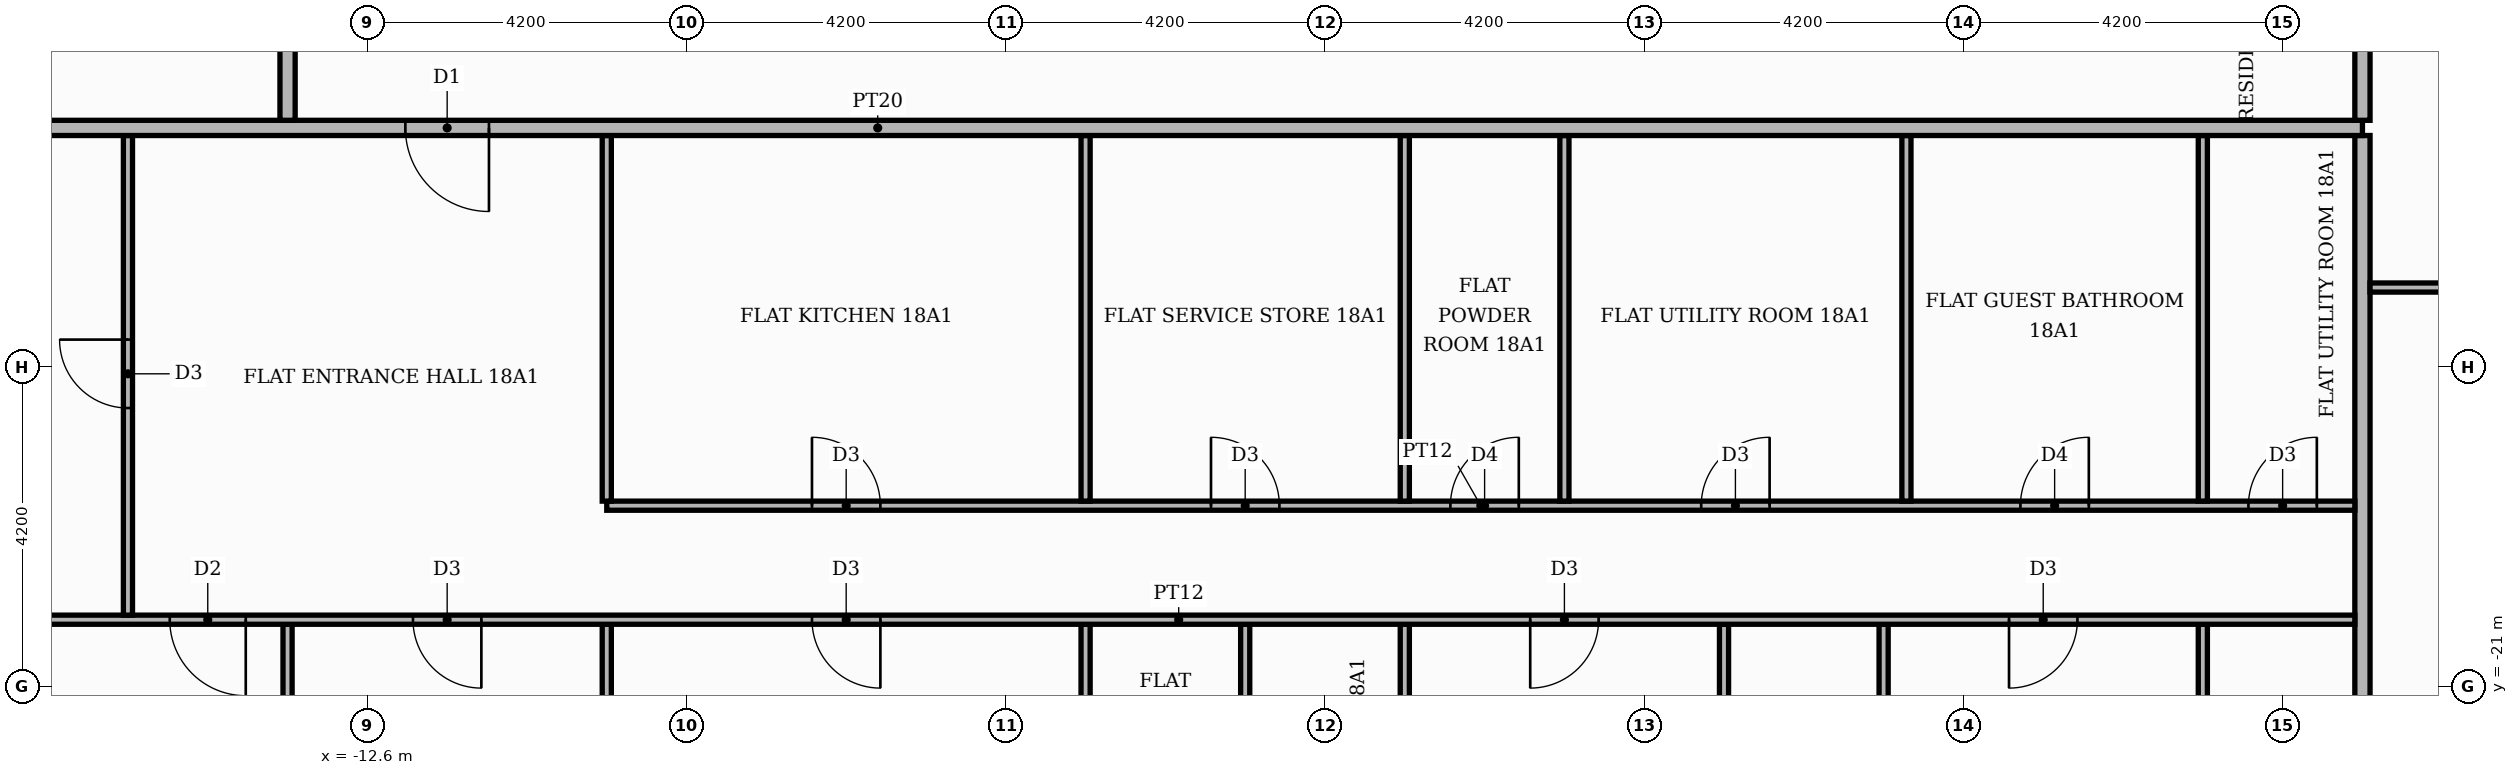
"""IFC4 building model, lengths in metres.
Left out: names, types, materials, properties, quantities, classifications, styles, units other than length and angle.
Written with IfcOpenShell. Run it as: python <this file> out.ifc"""

import sys

from ifc_helpers import new_model, si_unit, direction, frame, frame_2d, origin, place, context, subcontext, project, spatial, rectangle, extrude, element, fill, save


model = new_model("IFC4")
c1 = context("Model", 3, precision=1e-05, world=origin(), true_north=direction((0.0, 1.0)))
c2 = subcontext(c1, "Body", "Model", "MODEL_VIEW")
j1 = project(units=[si_unit("LENGTHUNIT", "METRE"), si_unit("PLANEANGLEUNIT", "RADIAN")], contexts=[c1])
p1 = place(None, origin())
s1 = spatial("IfcSite", under=j1, at=p1, CompositionType="ELEMENT")
p2 = place(p1, origin())
s2 = spatial("IfcBuilding", under=s1, at=p2, CompositionType="ELEMENT")
p3 = place(p2, frame((0.0, 0.0, 79.2)))
s3 = spatial("IfcBuildingStorey", under=s2, at=p3, CompositionType="ELEMENT", Elevation=79.2)
for number, where, z_axis, x_axis in (
    (1, (-13.65, -25.42, 0.0), (0.0, 0.0, 1.0), (0.0, 1.0, 0.0)),
    (2, (-9.45, -25.42, 0.0), (0.0, 0.0, 1.0), (0.0, 1.0, 0.0)),
):
    element("IfcWall", number, at=place(p3, frame(where, z_axis=z_axis, x_axis=x_axis)), inside=s3, PredefinedType="PARTITIONING", context=c2, shape_type="SweptSolid", body=[
        extrude(rectangle(XDim=5.24, YDim=0.12, at=frame_2d((2.62, 0.0))), origin(), (0.0, 0.0, 1.0), 3.48),
    ])
p4 = place(p3, frame((-3.15, -25.42, 0.0), z_axis=(0.0, 0.0, 1.0), x_axis=(0.0, 1.0, 0.0)))
e3 = element("IfcWall", 3, at=p4, inside=s3, PredefinedType="PARTITIONING", context=c2, shape_type="SweptSolid", body=[
    extrude(rectangle(XDim=5.24, YDim=0.12, at=frame_2d((2.62, 0.0))), origin(), (0.0, 0.0, 1.0), 3.48),
])
p5 = place(p4, frame((2.05, 0.0, 0.0)))
e4 = element("IfcOpeningElement", 4, at=p5, cuts=e3, PredefinedType="OPENING", context=c2, shape_type="SweptSolid", body=[
    extrude(rectangle(XDim=0.9, YDim=2.1, at=frame_2d((0.45, 1.05))), frame((0.0, 0.07, 0.0), z_axis=(0.0, -1.0, 0.0), x_axis=(1.0, 0.0, 0.0)), (0.0, 0.0, 1.0), 0.14),
])
p6 = place(p3, frame((-1.05, -25.42, 0.0), z_axis=(0.0, 0.0, 1.0), x_axis=(0.0, 1.0, 0.0)))
e5 = element("IfcWall", 5, at=p6, inside=s3, PredefinedType="PARTITIONING", context=c2, shape_type="SweptSolid", body=[
    extrude(rectangle(XDim=5.24, YDim=0.12, at=frame_2d((2.62, 0.0))), origin(), (0.0, 0.0, 1.0), 3.48),
])
p7 = place(p6, frame((2.05, 0.0, 0.0)))
e6 = element("IfcOpeningElement", 6, at=p7, cuts=e5, PredefinedType="OPENING", context=c2, shape_type="SweptSolid", body=[
    extrude(rectangle(XDim=0.9, YDim=2.1, at=frame_2d((0.45, 1.05))), frame((0.0, 0.07, 0.0), z_axis=(0.0, -1.0, 0.0), x_axis=(1.0, 0.0, 0.0)), (0.0, 0.0, 1.0), 0.14),
])
p8 = place(p3, frame((1.05, -25.42, 0.0), z_axis=(0.0, 0.0, 1.0), x_axis=(0.0, 1.0, 0.0)))
e7 = element("IfcWall", 7, at=p8, inside=s3, PredefinedType="PARTITIONING", context=c2, shape_type="SweptSolid", body=[
    extrude(rectangle(XDim=5.24, YDim=0.12, at=frame_2d((2.62, 0.0))), origin(), (0.0, 0.0, 1.0), 3.48),
])
p9 = place(p3, frame((5.25, -25.42, 0.0), z_axis=(0.0, 0.0, 1.0), x_axis=(0.0, 1.0, 0.0)))
e8 = element("IfcWall", 8, at=p9, inside=s3, PredefinedType="PARTITIONING", context=c2, shape_type="SweptSolid", body=[
    extrude(rectangle(XDim=5.24, YDim=0.12, at=frame_2d((2.62, 0.0))), origin(), (0.0, 0.0, 1.0), 3.48),
])
p10 = place(p9, frame((2.05, 0.0, 0.0)))
e9 = element("IfcOpeningElement", 9, at=p10, cuts=e8, PredefinedType="OPENING", context=c2, shape_type="SweptSolid", body=[
    extrude(rectangle(XDim=0.9, YDim=2.1, at=frame_2d((0.45, 1.05))), frame((0.0, 0.07, 0.0), z_axis=(0.0, -1.0, 0.0), x_axis=(1.0, 0.0, 0.0)), (0.0, 0.0, 1.0), 0.14),
])
p11 = place(p3, frame((7.35, -25.42, 0.0), z_axis=(0.0, 0.0, 1.0), x_axis=(0.0, 1.0, 0.0)))
e10 = element("IfcWall", 10, at=p11, inside=s3, PredefinedType="PARTITIONING", context=c2, shape_type="SweptSolid", body=[
    extrude(rectangle(XDim=5.24, YDim=0.12, at=frame_2d((2.62, 0.0))), origin(), (0.0, 0.0, 1.0), 3.48),
])
p12 = place(p3, frame((11.55, -25.42, 0.0), z_axis=(0.0, 0.0, 1.0), x_axis=(0.0, 1.0, 0.0)))
e11 = element("IfcWall", 11, at=p12, inside=s3, PredefinedType="PARTITIONING", context=c2, shape_type="SweptSolid", body=[
    extrude(rectangle(XDim=5.24, YDim=0.12, at=frame_2d((2.62, 0.0))), origin(), (0.0, 0.0, 1.0), 3.48),
])
p13 = place(p12, frame((2.05, 0.0, 0.0)))
e12 = element("IfcOpeningElement", 12, at=p13, cuts=e11, PredefinedType="OPENING", context=c2, shape_type="SweptSolid", body=[
    extrude(rectangle(XDim=0.9, YDim=2.1, at=frame_2d((0.45, 1.05))), frame((0.0, 0.07, 0.0), z_axis=(0.0, -1.0, 0.0), x_axis=(1.0, 0.0, 0.0)), (0.0, 0.0, 1.0), 0.14),
])
p14 = place(p3, frame((13.65, -25.42, 0.0), z_axis=(0.0, 0.0, 1.0), x_axis=(0.0, 1.0, 0.0)))
e13 = element("IfcWall", 13, at=p14, inside=s3, PredefinedType="PARTITIONING", context=c2, shape_type="SweptSolid", body=[
    extrude(rectangle(XDim=11.67, YDim=0.2, at=frame_2d((5.835, 0.0))), origin(), (0.0, 0.0, 1.0), 3.48),
])
p15 = place(p3, frame((-17.4, -20.12, 0.0), z_axis=(0.0, 0.0, 1.0), x_axis=(1.0, 0.0, 0.0)))
e14 = element("IfcWall", 14, at=p15, inside=s3, PredefinedType="PARTITIONING", context=c2, shape_type="SweptSolid", body=[
    extrude(rectangle(XDim=30.95, YDim=0.12, at=frame_2d((15.475, 0.0))), origin(), (0.0, 0.0, 1.0), 3.48),
])
p16 = place(p15, frame((2.2, 0.0, 0.0)))
e15 = element("IfcOpeningElement", 15, at=p16, cuts=e14, PredefinedType="OPENING", context=c2, shape_type="SweptSolid", body=[
    extrude(rectangle(XDim=1.0, YDim=2.1, at=frame_2d((0.5, 1.05))), frame((0.0, 0.07, 0.0), z_axis=(0.0, -1.0, 0.0), x_axis=(1.0, 0.0, 0.0)), (0.0, 0.0, 1.0), 0.14),
])
p17 = place(p15, frame((5.4, 0.0, 0.0)))
e16 = element("IfcOpeningElement", 16, at=p17, cuts=e14, PredefinedType="OPENING", context=c2, shape_type="SweptSolid", body=[
    extrude(rectangle(XDim=0.9, YDim=2.1, at=frame_2d((0.45, 1.05))), frame((0.0, 0.07, 0.0), z_axis=(0.0, -1.0, 0.0), x_axis=(1.0, 0.0, 0.0)), (0.0, 0.0, 1.0), 0.14),
])
p18 = place(p15, frame((10.65, 0.0, 0.0)))
e17 = element("IfcOpeningElement", 17, at=p18, cuts=e14, PredefinedType="OPENING", context=c2, shape_type="SweptSolid", body=[
    extrude(rectangle(XDim=0.9, YDim=2.1, at=frame_2d((0.45, 1.05))), frame((0.0, 0.07, 0.0), z_axis=(0.0, -1.0, 0.0), x_axis=(1.0, 0.0, 0.0)), (0.0, 0.0, 1.0), 0.14),
])
p19 = place(p15, frame((20.1, 0.0, 0.0)))
e18 = element("IfcOpeningElement", 18, at=p19, cuts=e14, PredefinedType="OPENING", context=c2, shape_type="SweptSolid", body=[
    extrude(rectangle(XDim=0.9, YDim=2.1, at=frame_2d((0.45, 1.05))), frame((0.0, 0.07, 0.0), z_axis=(0.0, -1.0, 0.0), x_axis=(1.0, 0.0, 0.0)), (0.0, 0.0, 1.0), 0.14),
])
p20 = place(p15, frame((26.4, 0.0, 0.0)))
e19 = element("IfcOpeningElement", 19, at=p20, cuts=e14, PredefinedType="OPENING", context=c2, shape_type="SweptSolid", body=[
    extrude(rectangle(XDim=0.9, YDim=2.1, at=frame_2d((0.45, 1.05))), frame((0.0, 0.07, 0.0), z_axis=(0.0, -1.0, 0.0), x_axis=(1.0, 0.0, 0.0)), (0.0, 0.0, 1.0), 0.14),
])
p21 = place(p3, frame((-15.75, -20.06, 0.0), z_axis=(0.0, 0.0, 1.0), x_axis=(0.0, 1.0, 0.0)))
e20 = element("IfcWall", 20, at=p21, inside=s3, PredefinedType="PARTITIONING", context=c2, shape_type="SweptSolid", body=[
    extrude(rectangle(XDim=6.31, YDim=0.12, at=frame_2d((3.155, 0.0))), origin(), (0.0, 0.0, 1.0), 3.48),
])
p22 = place(p21, frame((2.725, 0.0, 0.0)))
e21 = element("IfcOpeningElement", 21, at=p22, cuts=e20, PredefinedType="OPENING", context=c2, shape_type="SweptSolid", body=[
    extrude(rectangle(XDim=0.9, YDim=2.1, at=frame_2d((0.45, 1.05))), frame((0.0, 0.07, 0.0), z_axis=(0.0, -1.0, 0.0), x_axis=(1.0, 0.0, 0.0)), (0.0, 0.0, 1.0), 0.14),
])
p23 = place(p3, frame((-9.45, -18.62, 0.0), z_axis=(0.0, 0.0, 1.0), x_axis=(1.0, 0.0, 0.0)))
e22 = element("IfcWall", 22, at=p23, inside=s3, PredefinedType="PARTITIONING", context=c2, shape_type="SweptSolid", body=[
    extrude(rectangle(XDim=23.0, YDim=0.12, at=frame_2d((11.5, 0.0))), origin(), (0.0, 0.0, 1.0), 3.48),
])
p24 = place(p23, frame((2.7, 0.0, 0.0)))
e23 = element("IfcOpeningElement", 23, at=p24, cuts=e22, PredefinedType="OPENING", context=c2, shape_type="SweptSolid", body=[
    extrude(rectangle(XDim=0.9, YDim=2.1, at=frame_2d((0.45, 1.05))), frame((0.0, 0.07, 0.0), z_axis=(0.0, -1.0, 0.0), x_axis=(1.0, 0.0, 0.0)), (0.0, 0.0, 1.0), 0.14),
])
p25 = place(p23, frame((7.95, 0.0, 0.0)))
e24 = element("IfcOpeningElement", 24, at=p25, cuts=e22, PredefinedType="OPENING", context=c2, shape_type="SweptSolid", body=[
    extrude(rectangle(XDim=0.9, YDim=2.1, at=frame_2d((0.45, 1.05))), frame((0.0, 0.07, 0.0), z_axis=(0.0, -1.0, 0.0), x_axis=(1.0, 0.0, 0.0)), (0.0, 0.0, 1.0), 0.14),
])
p26 = place(p23, frame((11.1, 0.0, 0.0)))
e25 = element("IfcOpeningElement", 25, at=p26, cuts=e22, PredefinedType="OPENING", context=c2, shape_type="SweptSolid", body=[
    extrude(rectangle(XDim=0.9, YDim=2.1, at=frame_2d((0.45, 1.05))), frame((0.0, 0.07, 0.0), z_axis=(0.0, -1.0, 0.0), x_axis=(1.0, 0.0, 0.0)), (0.0, 0.0, 1.0), 0.14),
])
p27 = place(p23, frame((14.4, 0.0, 0.0)))
e26 = element("IfcOpeningElement", 26, at=p27, cuts=e22, PredefinedType="OPENING", context=c2, shape_type="SweptSolid", body=[
    extrude(rectangle(XDim=0.9, YDim=2.1, at=frame_2d((0.45, 1.05))), frame((0.0, 0.07, 0.0), z_axis=(0.0, -1.0, 0.0), x_axis=(1.0, 0.0, 0.0)), (0.0, 0.0, 1.0), 0.14),
])
p28 = place(p23, frame((18.6, 0.0, 0.0)))
e27 = element("IfcOpeningElement", 27, at=p28, cuts=e22, PredefinedType="OPENING", context=c2, shape_type="SweptSolid", body=[
    extrude(rectangle(XDim=0.9, YDim=2.1, at=frame_2d((0.45, 1.05))), frame((0.0, 0.07, 0.0), z_axis=(0.0, -1.0, 0.0), x_axis=(1.0, 0.0, 0.0)), (0.0, 0.0, 1.0), 0.14),
])
p29 = place(p23, frame((21.6, 0.0, 0.0)))
e28 = element("IfcOpeningElement", 28, at=p29, cuts=e22, PredefinedType="OPENING", context=c2, shape_type="SweptSolid", body=[
    extrude(rectangle(XDim=0.9, YDim=2.1, at=frame_2d((0.45, 1.05))), frame((0.0, 0.07, 0.0), z_axis=(0.0, -1.0, 0.0), x_axis=(1.0, 0.0, 0.0)), (0.0, 0.0, 1.0), 0.14),
])
for number, where, z_axis, x_axis in (
    (29, (-9.45, -18.56, 0.0), (0.0, 0.0, 1.0), (0.0, 1.0, 0.0)),
    (30, (-3.15, -18.56, 0.0), (0.0, 0.0, 1.0), (0.0, 1.0, 0.0)),
    (31, (1.05, -18.56, 0.0), (0.0, 0.0, 1.0), (0.0, 1.0, 0.0)),
    (32, (3.15, -18.56, 0.0), (0.0, 0.0, 1.0), (0.0, 1.0, 0.0)),
    (33, (7.65, -18.56, 0.0), (0.0, 0.0, 1.0), (0.0, 1.0, 0.0)),
    (34, (11.55, -18.56, 0.0), (0.0, 0.0, 1.0), (0.0, 1.0, 0.0)),
):
    element("IfcWall", number, at=place(p3, frame(where, z_axis=z_axis, x_axis=x_axis)), inside=s3, PredefinedType="PARTITIONING", context=c2, shape_type="SweptSolid", body=[
        extrude(rectangle(XDim=4.81, YDim=0.12, at=frame_2d((2.405, 0.0))), origin(), (0.0, 0.0, 1.0), 3.48),
    ])
p30 = place(p3, frame((13.75, -15.75, 0.0), z_axis=(0.0, 0.0, 1.0), x_axis=(1.0, 0.0, 0.0)))
e35 = element("IfcWall", 35, at=p30, inside=s3, PredefinedType="PARTITIONING", context=c2, shape_type="SweptSolid", body=[
    extrude(rectangle(XDim=6.97, YDim=0.12, at=frame_2d((3.485, 0.0))), origin(), (0.0, 0.0, 1.0), 3.48),
])
p31 = place(p30, frame((2.935, 0.0, 0.0)))
e36 = element("IfcOpeningElement", 36, at=p31, cuts=e35, PredefinedType="OPENING", context=c2, shape_type="SweptSolid", body=[
    extrude(rectangle(XDim=1.0, YDim=2.1, at=frame_2d((0.5, 1.05))), frame((0.0, 0.07, 0.0), z_axis=(0.0, -1.0, 0.0), x_axis=(1.0, 0.0, 0.0)), (0.0, 0.0, 1.0), 0.14),
])
p32 = place(p3, frame((-25.42, -13.65, 0.0), z_axis=(0.0, 0.0, 1.0), x_axis=(1.0, 0.0, 0.0)))
e37 = element("IfcWall", 37, at=p32, inside=s3, PredefinedType="PARTITIONING", context=c2, shape_type="SweptSolid", body=[
    extrude(rectangle(XDim=39.07, YDim=0.2, at=frame_2d((19.535, 0.0))), origin(), (0.0, 0.0, 1.0), 3.48),
])
p33 = place(p32, frame((13.32, 0.0, 0.0)))
e38 = element("IfcOpeningElement", 38, at=p33, cuts=e37, PredefinedType="OPENING", context=c2, shape_type="SweptSolid", body=[
    extrude(rectangle(XDim=1.1, YDim=2.4, at=frame_2d((0.55, 1.2))), frame((0.0, 0.11, 0.0), z_axis=(0.0, -1.0, 0.0), x_axis=(1.0, 0.0, 0.0)), (0.0, 0.0, 1.0), 0.22),
])
p34 = place(p3, frame((-13.65, -13.55, 0.0), z_axis=(0.0, 0.0, 1.0), x_axis=(0.0, 1.0, 0.0)))
e39 = element("IfcWall", 39, at=p34, inside=s3, PredefinedType="PARTITIONING", context=c2, shape_type="SweptSolid", body=[
    extrude(rectangle(XDim=18.7, YDim=0.2, at=frame_2d((9.35, 0.0))), origin(), (0.0, 0.0, 1.0), 3.48),
])
p35 = place(p34, frame((14.05, 0.0, 0.0)))
e40 = element("IfcOpeningElement", 40, at=p35, cuts=e39, PredefinedType="OPENING", context=c2, shape_type="SweptSolid", body=[
    extrude(rectangle(XDim=1.1, YDim=2.4, at=frame_2d((0.55, 1.2))), frame((0.0, 0.11, 0.0), z_axis=(0.0, -1.0, 0.0), x_axis=(1.0, 0.0, 0.0)), (0.0, 0.0, 1.0), 0.22),
])
p36 = place(p3, frame((13.65, -13.55, 0.0), z_axis=(0.0, 0.0, 1.0), x_axis=(0.0, 1.0, 0.0)))
e41 = element("IfcWall", 41, at=p36, inside=s3, PredefinedType="PARTITIONING", context=c2, shape_type="SweptSolid", body=[
    extrude(rectangle(XDim=8.2, YDim=0.2, at=frame_2d((4.1, 0.0))), origin(), (0.0, 0.0, 1.0), 3.48),
])
p37 = place(p36, frame((1.45, 0.0, 0.0)))
e42 = element("IfcOpeningElement", 42, at=p37, cuts=e41, PredefinedType="OPENING", context=c2, shape_type="SweptSolid", body=[
    extrude(rectangle(XDim=1.1, YDim=2.4, at=frame_2d((0.55, 1.2))), frame((0.0, 0.11, 0.0), z_axis=(0.0, -1.0, 0.0), x_axis=(1.0, 0.0, 0.0)), (0.0, 0.0, 1.0), 0.22),
])
p38 = place(p33, frame((1.1, 0.0, 0.0), z_axis=(0.0, 0.0, 1.0), x_axis=(-1.0, 0.0, 0.0)))
e43 = element("IfcDoor", 43, at=p38, inside=s3, OperationType="SINGLE_SWING_RIGHT", PredefinedType="DOOR", context=c2, shape_type="SweptSolid", body=[
    extrude(rectangle(XDim=1.1, YDim=2.4, at=frame_2d((0.55, 1.2))), frame((0.0, 0.025, 0.0), z_axis=(0.0, -1.0, 0.0), x_axis=(1.0, 0.0, 0.0)), (0.0, 0.0, 1.0), 0.05),
])
fill(e38, e43)
p39 = place(p22, origin())
e44 = element("IfcDoor", 44, at=p39, inside=s3, OperationType="SINGLE_SWING_RIGHT", PredefinedType="DOOR", context=c2, shape_type="SweptSolid", body=[
    extrude(rectangle(XDim=0.9, YDim=2.1, at=frame_2d((0.45, 1.05))), frame((0.0, 0.025, 0.0), z_axis=(0.0, -1.0, 0.0), x_axis=(1.0, 0.0, 0.0)), (0.0, 0.0, 1.0), 0.05),
])
fill(e21, e44)
p40 = place(p24, origin())
e45 = element("IfcDoor", 45, at=p40, inside=s3, OperationType="SINGLE_SWING_LEFT", PredefinedType="DOOR", context=c2, shape_type="SweptSolid", body=[
    extrude(rectangle(XDim=0.9, YDim=2.1, at=frame_2d((0.45, 1.05))), frame((0.0, 0.025, 0.0), z_axis=(0.0, -1.0, 0.0), x_axis=(1.0, 0.0, 0.0)), (0.0, 0.0, 1.0), 0.05),
])
fill(e23, e45)
p41 = place(p25, origin())
e46 = element("IfcDoor", 46, at=p41, inside=s3, OperationType="SINGLE_SWING_LEFT", PredefinedType="DOOR", context=c2, shape_type="SweptSolid", body=[
    extrude(rectangle(XDim=0.9, YDim=2.1, at=frame_2d((0.45, 1.05))), frame((0.0, 0.025, 0.0), z_axis=(0.0, -1.0, 0.0), x_axis=(1.0, 0.0, 0.0)), (0.0, 0.0, 1.0), 0.05),
])
fill(e24, e46)
p42 = place(p26, origin())
e47 = element("IfcDoor", 47, at=p42, inside=s3, OperationType="SINGLE_SWING_RIGHT", PredefinedType="DOOR", context=c2, shape_type="SweptSolid", body=[
    extrude(rectangle(XDim=0.9, YDim=2.1, at=frame_2d((0.45, 1.05))), frame((0.0, 0.025, 0.0), z_axis=(0.0, -1.0, 0.0), x_axis=(1.0, 0.0, 0.0)), (0.0, 0.0, 1.0), 0.05),
])
fill(e25, e47)
p43 = place(p27, origin())
e48 = element("IfcDoor", 48, at=p43, inside=s3, OperationType="SINGLE_SWING_RIGHT", PredefinedType="DOOR", context=c2, shape_type="SweptSolid", body=[
    extrude(rectangle(XDim=0.9, YDim=2.1, at=frame_2d((0.45, 1.05))), frame((0.0, 0.025, 0.0), z_axis=(0.0, -1.0, 0.0), x_axis=(1.0, 0.0, 0.0)), (0.0, 0.0, 1.0), 0.05),
])
fill(e26, e48)
p44 = place(p28, origin())
e49 = element("IfcDoor", 49, at=p44, inside=s3, OperationType="SINGLE_SWING_RIGHT", PredefinedType="DOOR", context=c2, shape_type="SweptSolid", body=[
    extrude(rectangle(XDim=0.9, YDim=2.1, at=frame_2d((0.45, 1.05))), frame((0.0, 0.025, 0.0), z_axis=(0.0, -1.0, 0.0), x_axis=(1.0, 0.0, 0.0)), (0.0, 0.0, 1.0), 0.05),
])
fill(e27, e49)
p45 = place(p29, origin())
e50 = element("IfcDoor", 50, at=p45, inside=s3, OperationType="SINGLE_SWING_RIGHT", PredefinedType="DOOR", context=c2, shape_type="SweptSolid", body=[
    extrude(rectangle(XDim=0.9, YDim=2.1, at=frame_2d((0.45, 1.05))), frame((0.0, 0.025, 0.0), z_axis=(0.0, -1.0, 0.0), x_axis=(1.0, 0.0, 0.0)), (0.0, 0.0, 1.0), 0.05),
])
fill(e28, e50)
p46 = place(p16, frame((1.0, 0.0, 0.0), z_axis=(0.0, 0.0, 1.0), x_axis=(-1.0, 0.0, 0.0)))
e51 = element("IfcDoor", 51, at=p46, inside=s3, OperationType="SINGLE_SWING_RIGHT", PredefinedType="DOOR", context=c2, shape_type="SweptSolid", body=[
    extrude(rectangle(XDim=1.0, YDim=2.1, at=frame_2d((0.5, 1.05))), frame((0.0, 0.025, 0.0), z_axis=(0.0, -1.0, 0.0), x_axis=(1.0, 0.0, 0.0)), (0.0, 0.0, 1.0), 0.05),
])
fill(e15, e51)
p47 = place(p17, frame((0.9, 0.0, 0.0), z_axis=(0.0, 0.0, 1.0), x_axis=(-1.0, 0.0, 0.0)))
e52 = element("IfcDoor", 52, at=p47, inside=s3, OperationType="SINGLE_SWING_RIGHT", PredefinedType="DOOR", context=c2, shape_type="SweptSolid", body=[
    extrude(rectangle(XDim=0.9, YDim=2.1, at=frame_2d((0.45, 1.05))), frame((0.0, 0.025, 0.0), z_axis=(0.0, -1.0, 0.0), x_axis=(1.0, 0.0, 0.0)), (0.0, 0.0, 1.0), 0.05),
])
fill(e16, e52)
p48 = place(p18, frame((0.9, 0.0, 0.0), z_axis=(0.0, 0.0, 1.0), x_axis=(-1.0, 0.0, 0.0)))
e53 = element("IfcDoor", 53, at=p48, inside=s3, OperationType="SINGLE_SWING_RIGHT", PredefinedType="DOOR", context=c2, shape_type="SweptSolid", body=[
    extrude(rectangle(XDim=0.9, YDim=2.1, at=frame_2d((0.45, 1.05))), frame((0.0, 0.025, 0.0), z_axis=(0.0, -1.0, 0.0), x_axis=(1.0, 0.0, 0.0)), (0.0, 0.0, 1.0), 0.05),
])
fill(e17, e53)
p49 = place(p19, frame((0.9, 0.0, 0.0), z_axis=(0.0, 0.0, 1.0), x_axis=(-1.0, 0.0, 0.0)))
e54 = element("IfcDoor", 54, at=p49, inside=s3, OperationType="SINGLE_SWING_LEFT", PredefinedType="DOOR", context=c2, shape_type="SweptSolid", body=[
    extrude(rectangle(XDim=0.9, YDim=2.1, at=frame_2d((0.45, 1.05))), frame((0.0, 0.025, 0.0), z_axis=(0.0, -1.0, 0.0), x_axis=(1.0, 0.0, 0.0)), (0.0, 0.0, 1.0), 0.05),
])
fill(e18, e54)
p50 = place(p20, frame((0.9, 0.0, 0.0), z_axis=(0.0, 0.0, 1.0), x_axis=(-1.0, 0.0, 0.0)))
e55 = element("IfcDoor", 55, at=p50, inside=s3, OperationType="SINGLE_SWING_LEFT", PredefinedType="DOOR", context=c2, shape_type="SweptSolid", body=[
    extrude(rectangle(XDim=0.9, YDim=2.1, at=frame_2d((0.45, 1.05))), frame((0.0, 0.025, 0.0), z_axis=(0.0, -1.0, 0.0), x_axis=(1.0, 0.0, 0.0)), (0.0, 0.0, 1.0), 0.05),
])
fill(e19, e55)
save(model, sys.argv[1])
